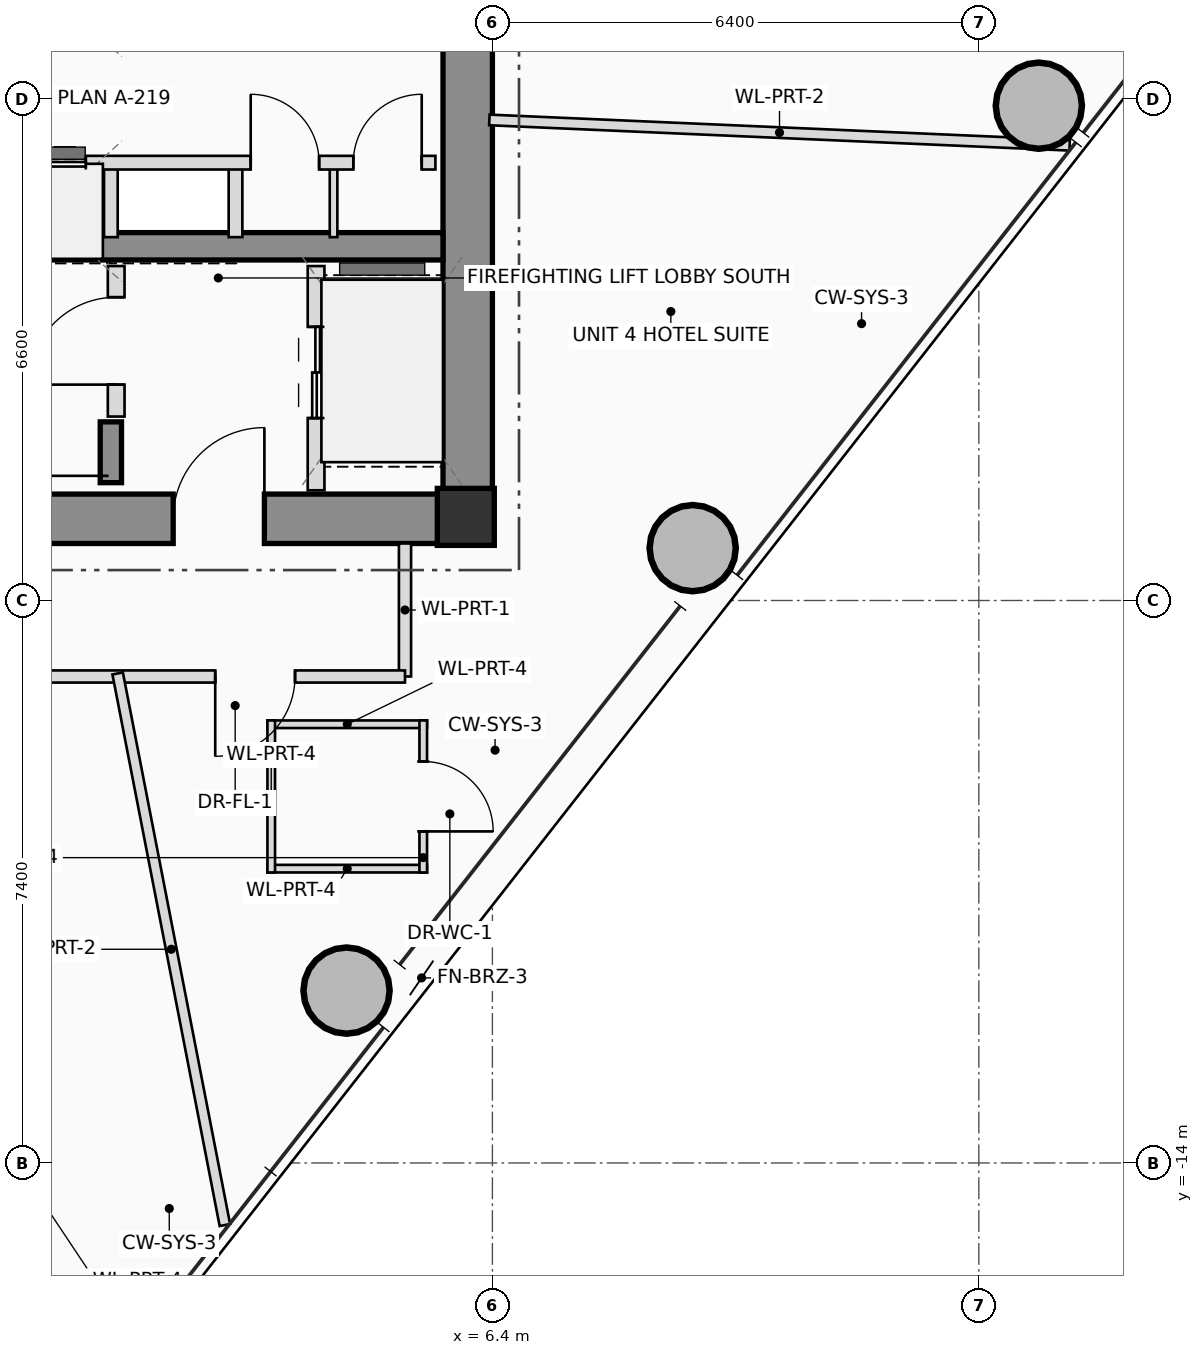
"""IFC4 building model, lengths in metres.
Left out: names, types, materials, properties, quantities, classifications, styles, units other than length and angle.
Written with IfcOpenShell. Run it as: python <this file> out.ifc"""

import sys

from ifc_helpers import new_model, si_unit, direction, frame, frame_2d, origin, origin_2d, place, context, subcontext, project, spatial, rectangle, hollow_circle, extrude, source, transform, mapped, element, fill, save


model = new_model("IFC4")
c1 = context("Model", 3, precision=1e-05, world=origin(), true_north=direction((0.0, 1.0)))
c2 = subcontext(c1, "Body", "Model", "MODEL_VIEW")
j1 = project(units=[si_unit("LENGTHUNIT", "METRE"), si_unit("PLANEANGLEUNIT", "RADIAN")], contexts=[c1])
p1 = place(None, origin())
s1 = spatial("IfcSite", under=j1, at=p1, CompositionType="ELEMENT")
p2 = place(p1, origin())
s2 = spatial("IfcBuilding", under=s1, at=p2, CompositionType="ELEMENT")
p3 = place(p2, frame((0.0, 0.0, 215.6)))
s3 = spatial("IfcBuildingStorey", under=s2, at=p3, CompositionType="ELEMENT", Elevation=215.6)
m1 = source(origin(), c2, "Body", "SweptSolid", [
    extrude(rectangle(XDim=0.75, YDim=0.75, at=origin_2d()), origin(), (0.0, 0.0, 1.0), 3.45),
])
p4 = place(p3, frame((6.05, -5.5, 0.0), z_axis=(0.0, 0.0, 1.0), x_axis=(1.0, 0.0, 0.0)))
e1 = element("IfcColumn", 1, at=p4, inside=s3, PredefinedType="COLUMN", context=c2, shape_type="MappedRepresentation", body=[
    mapped(m1, transform((0.0, 0.0, 0.0), scale=1.0)),
])
p5 = place(p3, frame((-6.4, -5.525, 0.0), z_axis=(0.0, 0.0, 1.0), x_axis=(1.0, 0.0, 0.0)))
e2 = element("IfcWall", 2, at=p5, inside=s3, PredefinedType="SHEAR", context=c2, shape_type="SweptSolid", body=[
    extrude(rectangle(XDim=12.8, YDim=0.65, at=frame_2d((6.4, 0.0))), origin(), (0.0, 0.0, 1.0), 3.45),
])
p6 = place(p5, frame((8.6, 0.0, 0.0)))
e3 = element("IfcOpeningElement", 3, at=p6, cuts=e2, PredefinedType="OPENING", context=c2, shape_type="SweptSolid", body=[
    extrude(rectangle(XDim=1.2, YDim=2.2, at=frame_2d((0.6, 1.1))), frame((0.0, 0.335, 0.0), z_axis=(0.0, -1.0, 0.0), x_axis=(1.0, 0.0, 0.0)), (0.0, 0.0, 1.0), 0.67),
])
p7 = place(p3, frame((6.075, -5.2, 0.0), z_axis=(0.0, 0.0, 1.0), x_axis=(0.0, 1.0, 0.0)))
e4 = element("IfcWall", 4, at=p7, inside=s3, PredefinedType="SHEAR", context=c2, shape_type="SweptSolid", body=[
    extrude(rectangle(XDim=10.4, YDim=0.65, at=frame_2d((5.2, 0.0))), origin(), (0.0, 0.0, 1.0), 3.45),
])
p8 = place(p3, frame((-5.75, -1.94, 0.0), z_axis=(0.0, 0.0, 1.0), x_axis=(1.0, 0.0, 0.0)))
e5 = element("IfcWall", 5, at=p8, inside=s3, PredefinedType="SHEAR", context=c2, shape_type="SweptSolid", body=[
    extrude(rectangle(XDim=11.5, YDim=0.36, at=frame_2d((5.75, 0.0))), origin(), (0.0, 0.0, 1.0), 3.45),
])
p9 = place(p3, frame((1.38, -5.05, 0.0), z_axis=(0.0, 0.0, 1.0), x_axis=(0.0, 1.0, 0.0)))
e6 = element("IfcWall", 6, at=p9, inside=s3, PredefinedType="SHEAR", context=c2, shape_type="SweptSolid", body=[
    extrude(rectangle(XDim=0.8, YDim=0.28, at=frame_2d((0.4, 0.0))), origin(), (0.0, 0.0, 1.0), 3.45),
])
m2 = source(origin(), c2, "Body", "SweptSolid", [
    extrude(hollow_circle(Radius=0.575, WallThickness=0.042, at=origin_2d()), origin(), (0.0, 0.0, 1.0), 3.45),
])
for number, where, z_axis, x_axis in (
    (7, (4.481, -11.732, 0.0), (0.0, 0.0, 1.0), (1.0, 0.0, 0.0)),
    (8, (9.035, -5.911, 0.0), (0.0, 0.0, 1.0), (1.0, 0.0, 0.0)),
    (9, (13.59, -0.09, 0.0), (0.0, 0.0, 1.0), (1.0, 0.0, 0.0)),
):
    element("IfcColumn", number, at=place(p3, frame(where, z_axis=z_axis, x_axis=x_axis)), inside=s3, PredefinedType="COLUMN", context=c2, shape_type="MappedRepresentation", body=[
        mapped(m2, transform((0.0, 0.0, 0.0), scale=1.0)),
    ])
p10 = place(p3, frame((1.45, -4.18, 0.0), z_axis=(0.0, 0.0, 1.0), x_axis=(0.0, 1.0, 0.0)))
e10 = element("IfcWall", 10, at=p10, inside=s3, PredefinedType="PLUMBINGWALL", context=c2, shape_type="SweptSolid", body=[
    extrude(rectangle(XDim=1.98, YDim=0.22, at=frame_2d((0.99, 0.0))), origin(), (0.0, 0.0, 1.0), 3.21),
])
p11 = place(p10, frame((0.42, 0.0, 0.0)))
e11 = element("IfcOpeningElement", 11, at=p11, cuts=e10, PredefinedType="OPENING", context=c2, shape_type="SweptSolid", body=[
    extrude(rectangle(XDim=1.15, YDim=2.15, at=frame_2d((0.575, 1.075))), frame((0.0, 0.12, 0.0), z_axis=(0.0, -1.0, 0.0), x_axis=(1.0, 0.0, 0.0)), (0.0, 0.0, 1.0), 0.24),
])
p12 = place(p3, frame((4.08, -5.15, 0.0), z_axis=(0.0, 0.0, 1.0), x_axis=(0.0, 1.0, 0.0)))
e12 = element("IfcWall", 12, at=p12, inside=s3, PredefinedType="PLUMBINGWALL", context=c2, shape_type="SweptSolid", body=[
    extrude(rectangle(XDim=2.95, YDim=0.22, at=frame_2d((1.475, 0.0))), origin(), (0.0, 0.0, 1.0), 3.21),
])
p13 = place(p12, frame((0.95, 0.0, 0.0)))
e13 = element("IfcOpeningElement", 13, at=p13, cuts=e12, PredefinedType="OPENING", context=c2, shape_type="SweptSolid", body=[
    extrude(rectangle(XDim=1.2, YDim=2.25, at=frame_2d((0.6, 1.125))), frame((0.0, 0.12, 0.0), z_axis=(0.0, -1.0, 0.0), x_axis=(1.0, 0.0, 0.0)), (0.0, 0.0, 1.0), 0.24),
])
for number, where, z_axis, x_axis in (
    (14, (1.38, -1.82, 0.0), (0.0, 0.0, 1.0), (0.0, 1.0, 0.0)),
    (15, (3.02, -1.82, 0.0), (0.0, 0.0, 1.0), (0.0, 1.0, 0.0)),
):
    element("IfcWall", number, at=place(p3, frame(where, z_axis=z_axis, x_axis=x_axis)), inside=s3, PredefinedType="PLUMBINGWALL", context=c2, shape_type="SweptSolid", body=[
        extrude(rectangle(XDim=0.98, YDim=0.18, at=frame_2d((0.49, 0.0))), origin(), (0.0, 0.0, 1.0), 3.21),
    ])
p14 = place(p3, frame((4.31, -1.82, 0.0), z_axis=(0.0, 0.0, 1.0), x_axis=(0.0, 1.0, 0.0)))
e16 = element("IfcWall", 16, at=p14, inside=s3, PredefinedType="PARTITIONING", context=c2, shape_type="SweptSolid", body=[
    extrude(rectangle(XDim=0.98, YDim=0.1, at=frame_2d((0.49, 0.0))), origin(), (0.0, 0.0, 1.0), 3.21),
])
p15 = place(p3, frame((-5.68, -0.84, 0.0), z_axis=(0.0, 0.0, 1.0), x_axis=(1.0, 0.0, 0.0)))
e17 = element("IfcWall", 17, at=p15, inside=s3, PredefinedType="PLUMBINGWALL", context=c2, shape_type="SweptSolid", body=[
    extrude(rectangle(XDim=11.33, YDim=0.18, at=frame_2d((5.665, 0.0))), origin(), (0.0, 0.0, 1.0), 3.21),
])
p16 = place(p15, frame((1.18, 0.0, 0.0)))
e18 = element("IfcOpeningElement", 18, at=p16, cuts=e17, PredefinedType="OPENING", context=c2, shape_type="SweptSolid", body=[
    extrude(rectangle(XDim=0.9, YDim=2.05, at=frame_2d((0.45, 1.025))), frame((0.0, 0.1, 0.0), z_axis=(0.0, -1.0, 0.0), x_axis=(1.0, 0.0, 0.0)), (0.0, 0.0, 1.0), 0.2),
])
p17 = place(p15, frame((3.93, 0.0, 0.0)))
e19 = element("IfcOpeningElement", 19, at=p17, cuts=e17, PredefinedType="OPENING", context=c2, shape_type="SweptSolid", body=[
    extrude(rectangle(XDim=1.1, YDim=2.2, at=frame_2d((0.55, 1.1))), frame((0.0, 0.1, 0.0), z_axis=(0.0, -1.0, 0.0), x_axis=(1.0, 0.0, 0.0)), (0.0, 0.0, 1.0), 0.2),
])
p18 = place(p15, frame((5.63, 0.0, 0.0)))
e20 = element("IfcOpeningElement", 20, at=p18, cuts=e17, PredefinedType="OPENING", context=c2, shape_type="SweptSolid", body=[
    extrude(rectangle(XDim=1.1, YDim=2.2, at=frame_2d((0.55, 1.1))), frame((0.0, 0.1, 0.0), z_axis=(0.0, -1.0, 0.0), x_axis=(1.0, 0.0, 0.0)), (0.0, 0.0, 1.0), 0.2),
])
p19 = place(p15, frame((8.9, 0.0, 0.0)))
e21 = element("IfcOpeningElement", 21, at=p19, cuts=e17, PredefinedType="OPENING", context=c2, shape_type="SweptSolid", body=[
    extrude(rectangle(XDim=0.9, YDim=2.05, at=frame_2d((0.45, 1.025))), frame((0.0, 0.1, 0.0), z_axis=(0.0, -1.0, 0.0), x_axis=(1.0, 0.0, 0.0)), (0.0, 0.0, 1.0), 0.2),
])
p20 = place(p15, frame((10.25, 0.0, 0.0)))
e22 = element("IfcOpeningElement", 22, at=p20, cuts=e17, PredefinedType="OPENING", context=c2, shape_type="SweptSolid", body=[
    extrude(rectangle(XDim=0.9, YDim=2.05, at=frame_2d((0.45, 1.025))), frame((0.0, 0.1, 0.0), z_axis=(0.0, -1.0, 0.0), x_axis=(1.0, 0.0, 0.0)), (0.0, 0.0, 1.0), 0.2),
])
for number, where, z_axis, x_axis in (
    (23, (3.44, -8.228, 0.0), (0.0, 0.0, 1.0), (1.0, 0.0, 0.0)),
    (24, (5.54, -10.128, 0.0), (0.0, 0.0, 1.0), (-1.0, 0.0, 0.0)),
):
    element("IfcWall", number, at=place(p3, frame(where, z_axis=z_axis, x_axis=x_axis)), inside=s3, PredefinedType="PARTITIONING", context=c2, shape_type="SweptSolid", body=[
        extrude(rectangle(XDim=2.1, YDim=0.1, at=frame_2d((1.05, 0.0))), origin(), (0.0, 0.0, 1.0), 2.565),
    ])
p21 = place(p3, frame((5.49, -8.178, 0.0), z_axis=(0.0, 0.0, 1.0), x_axis=(0.0, -1.0, 0.0)))
e25 = element("IfcWall", 25, at=p21, inside=s3, PredefinedType="PARTITIONING", context=c2, shape_type="SweptSolid", body=[
    extrude(rectangle(XDim=2.0, YDim=0.1, at=frame_2d((1.0, 0.0))), origin(), (0.0, 0.0, 1.0), 2.565),
])
p22 = place(p21, frame((0.54, 0.0, 0.0)))
e26 = element("IfcOpeningElement", 26, at=p22, cuts=e25, PredefinedType="OPENING", context=c2, shape_type="SweptSolid", body=[
    extrude(rectangle(XDim=0.92, YDim=2.1, at=frame_2d((0.46, 1.05))), frame((0.0, 0.06, 0.0), z_axis=(0.0, -1.0, 0.0), x_axis=(1.0, 0.0, 0.0)), (0.0, 0.0, 1.0), 0.12),
])
p23 = place(p3, frame((3.49, -10.178, 0.0), z_axis=(0.0, 0.0, 1.0), x_axis=(0.0, 1.0, 0.0)))
e27 = element("IfcWall", 27, at=p23, inside=s3, PredefinedType="PARTITIONING", context=c2, shape_type="SweptSolid", body=[
    extrude(rectangle(XDim=2.0, YDim=0.1, at=frame_2d((1.0, 0.0))), origin(), (0.0, 0.0, 1.0), 2.765),
])
p24 = place(p3, frame((5.25, -5.85, 0.0), z_axis=(0.0, 0.0, 1.0), x_axis=(0.0, -1.0, 0.0)))
e28 = element("IfcWall", 28, at=p24, inside=s3, PredefinedType="PARTITIONING", context=c2, shape_type="SweptSolid", body=[
    extrude(rectangle(XDim=1.75, YDim=0.16, at=frame_2d((0.875, 0.0))), origin(), (0.0, 0.0, 1.0), 3.21),
])
p25 = place(p3, frame((5.25, -7.6, 0.0), z_axis=(0.0, 0.0, 1.0), x_axis=(-1.0, 0.0, 0.0)))
e29 = element("IfcWall", 29, at=p25, inside=s3, PredefinedType="PARTITIONING", context=c2, shape_type="SweptSolid", body=[
    extrude(rectangle(XDim=11.61, YDim=0.16, at=frame_2d((5.805, 0.0))), origin(), (0.0, 0.0, 1.0), 2.565),
])
p26 = place(p25, frame((1.447, 0.0, 0.0)))
e30 = element("IfcOpeningElement", 30, at=p26, cuts=e29, PredefinedType="OPENING", context=c2, shape_type="SweptSolid", body=[
    extrude(rectangle(XDim=1.05, YDim=2.2, at=frame_2d((0.525, 1.1))), frame((0.0, 0.09, 0.0), z_axis=(0.0, -1.0, 0.0), x_axis=(1.0, 0.0, 0.0)), (0.0, 0.0, 1.0), 0.18),
])
p27 = place(p25, frame((4.912, 0.0, 0.0)))
e31 = element("IfcOpeningElement", 31, at=p27, cuts=e29, PredefinedType="OPENING", context=c2, shape_type="SweptSolid", body=[
    extrude(rectangle(XDim=1.05, YDim=2.2, at=frame_2d((0.525, 1.1))), frame((0.0, 0.09, 0.0), z_axis=(0.0, -1.0, 0.0), x_axis=(1.0, 0.0, 0.0)), (0.0, 0.0, 1.0), 0.18),
])
p28 = place(p3, frame((6.36, -0.278, 0.0), z_axis=(0.0, 0.0, 1.0), x_axis=(0.999047276506, -0.04364102778, 0.0)))
e32 = element("IfcWall", 32, at=p28, inside=s3, PredefinedType="PARTITIONING", context=c2, shape_type="SweptSolid", body=[
    extrude(rectangle(XDim=7.642, YDim=0.14, at=frame_2d((3.821, 0.0))), origin(), (0.0, 0.0, 1.0), 2.565),
])
p29 = place(p3, frame((1.469, -7.56, 0.0), z_axis=(0.0, 0.0, 1.0), x_axis=(0.190822808967, -0.981624498257, 0.0)))
e33 = element("IfcWall", 33, at=p29, inside=s3, PredefinedType="PARTITIONING", context=c2, shape_type="SweptSolid", body=[
    extrude(rectangle(XDim=7.392, YDim=0.14, at=frame_2d((3.696, 0.0))), origin(), (0.0, 0.0, 1.0), 2.725),
])
p30 = place(p6, origin())
e34 = element("IfcDoor", 34, at=p30, inside=s3, OperationType="SINGLE_SWING_RIGHT", PredefinedType="DOOR", context=c2, shape_type="SweptSolid", body=[
    extrude(rectangle(XDim=1.2, YDim=2.2, at=frame_2d((0.6, 1.1))), frame((0.0, 0.025, 0.0), z_axis=(0.0, -1.0, 0.0), x_axis=(1.0, 0.0, 0.0)), (0.0, 0.0, 1.0), 0.05),
])
fill(e3, e34)
p31 = place(p11, origin())
e35 = element("IfcDoor", 35, at=p31, inside=s3, OperationType="SINGLE_SWING_LEFT", PredefinedType="DOOR", context=c2, shape_type="SweptSolid", body=[
    extrude(rectangle(XDim=1.15, YDim=2.15, at=frame_2d((0.575, 1.075))), frame((0.0, 0.025, 0.0), z_axis=(0.0, -1.0, 0.0), x_axis=(1.0, 0.0, 0.0)), (0.0, 0.0, 1.0), 0.05),
])
fill(e11, e35)
p32 = place(p13, origin())
e36 = element("IfcDoor", 36, at=p32, inside=s3, OperationType="DOUBLE_DOOR_SLIDING", PredefinedType="DOOR", context=c2, shape_type="SweptSolid", body=[
    extrude(rectangle(XDim=1.2, YDim=2.25, at=frame_2d((0.6, 1.125))), frame((0.0, 0.025, 0.0), z_axis=(0.0, -1.0, 0.0), x_axis=(1.0, 0.0, 0.0)), (0.0, 0.0, 1.0), 0.05),
])
fill(e13, e36)
p33 = place(p18, origin())
e37 = element("IfcDoor", 37, at=p33, inside=s3, OperationType="DOUBLE_DOOR_SLIDING", PredefinedType="DOOR", context=c2, shape_type="SweptSolid", body=[
    extrude(rectangle(XDim=1.1, YDim=2.2, at=frame_2d((0.55, 1.1))), frame((0.0, 0.025, 0.0), z_axis=(0.0, -1.0, 0.0), x_axis=(1.0, 0.0, 0.0)), (0.0, 0.0, 1.0), 0.05),
])
fill(e20, e37)
p34 = place(p19, origin())
e38 = element("IfcDoor", 38, at=p34, inside=s3, OperationType="SINGLE_SWING_LEFT", PredefinedType="DOOR", context=c2, shape_type="SweptSolid", body=[
    extrude(rectangle(XDim=0.9, YDim=2.05, at=frame_2d((0.45, 1.025))), frame((0.0, 0.025, 0.0), z_axis=(0.0, -1.0, 0.0), x_axis=(1.0, 0.0, 0.0)), (0.0, 0.0, 1.0), 0.05),
])
fill(e21, e38)
p35 = place(p20, origin())
e39 = element("IfcDoor", 39, at=p35, inside=s3, OperationType="SINGLE_SWING_RIGHT", PredefinedType="DOOR", context=c2, shape_type="SweptSolid", body=[
    extrude(rectangle(XDim=0.9, YDim=2.05, at=frame_2d((0.45, 1.025))), frame((0.0, 0.025, 0.0), z_axis=(0.0, -1.0, 0.0), x_axis=(1.0, 0.0, 0.0)), (0.0, 0.0, 1.0), 0.05),
])
fill(e22, e39)
p36 = place(p22, origin())
e40 = element("IfcDoor", 40, at=p36, inside=s3, OperationType="SINGLE_SWING_RIGHT", PredefinedType="DOOR", context=c2, shape_type="SweptSolid", body=[
    extrude(rectangle(XDim=0.92, YDim=2.1, at=frame_2d((0.46, 1.05))), frame((0.0, 0.025, 0.0), z_axis=(0.0, -1.0, 0.0), x_axis=(1.0, 0.0, 0.0)), (0.0, 0.0, 1.0), 0.05),
])
fill(e26, e40)
p37 = place(p26, origin())
e41 = element("IfcDoor", 41, at=p37, inside=s3, OperationType="SINGLE_SWING_RIGHT", PredefinedType="DOOR", context=c2, shape_type="SweptSolid", body=[
    extrude(rectangle(XDim=1.05, YDim=2.2, at=frame_2d((0.525, 1.1))), frame((0.0, 0.025, 0.0), z_axis=(0.0, -1.0, 0.0), x_axis=(1.0, 0.0, 0.0)), (0.0, 0.0, 1.0), 0.05),
])
fill(e30, e41)
save(model, sys.argv[1])
